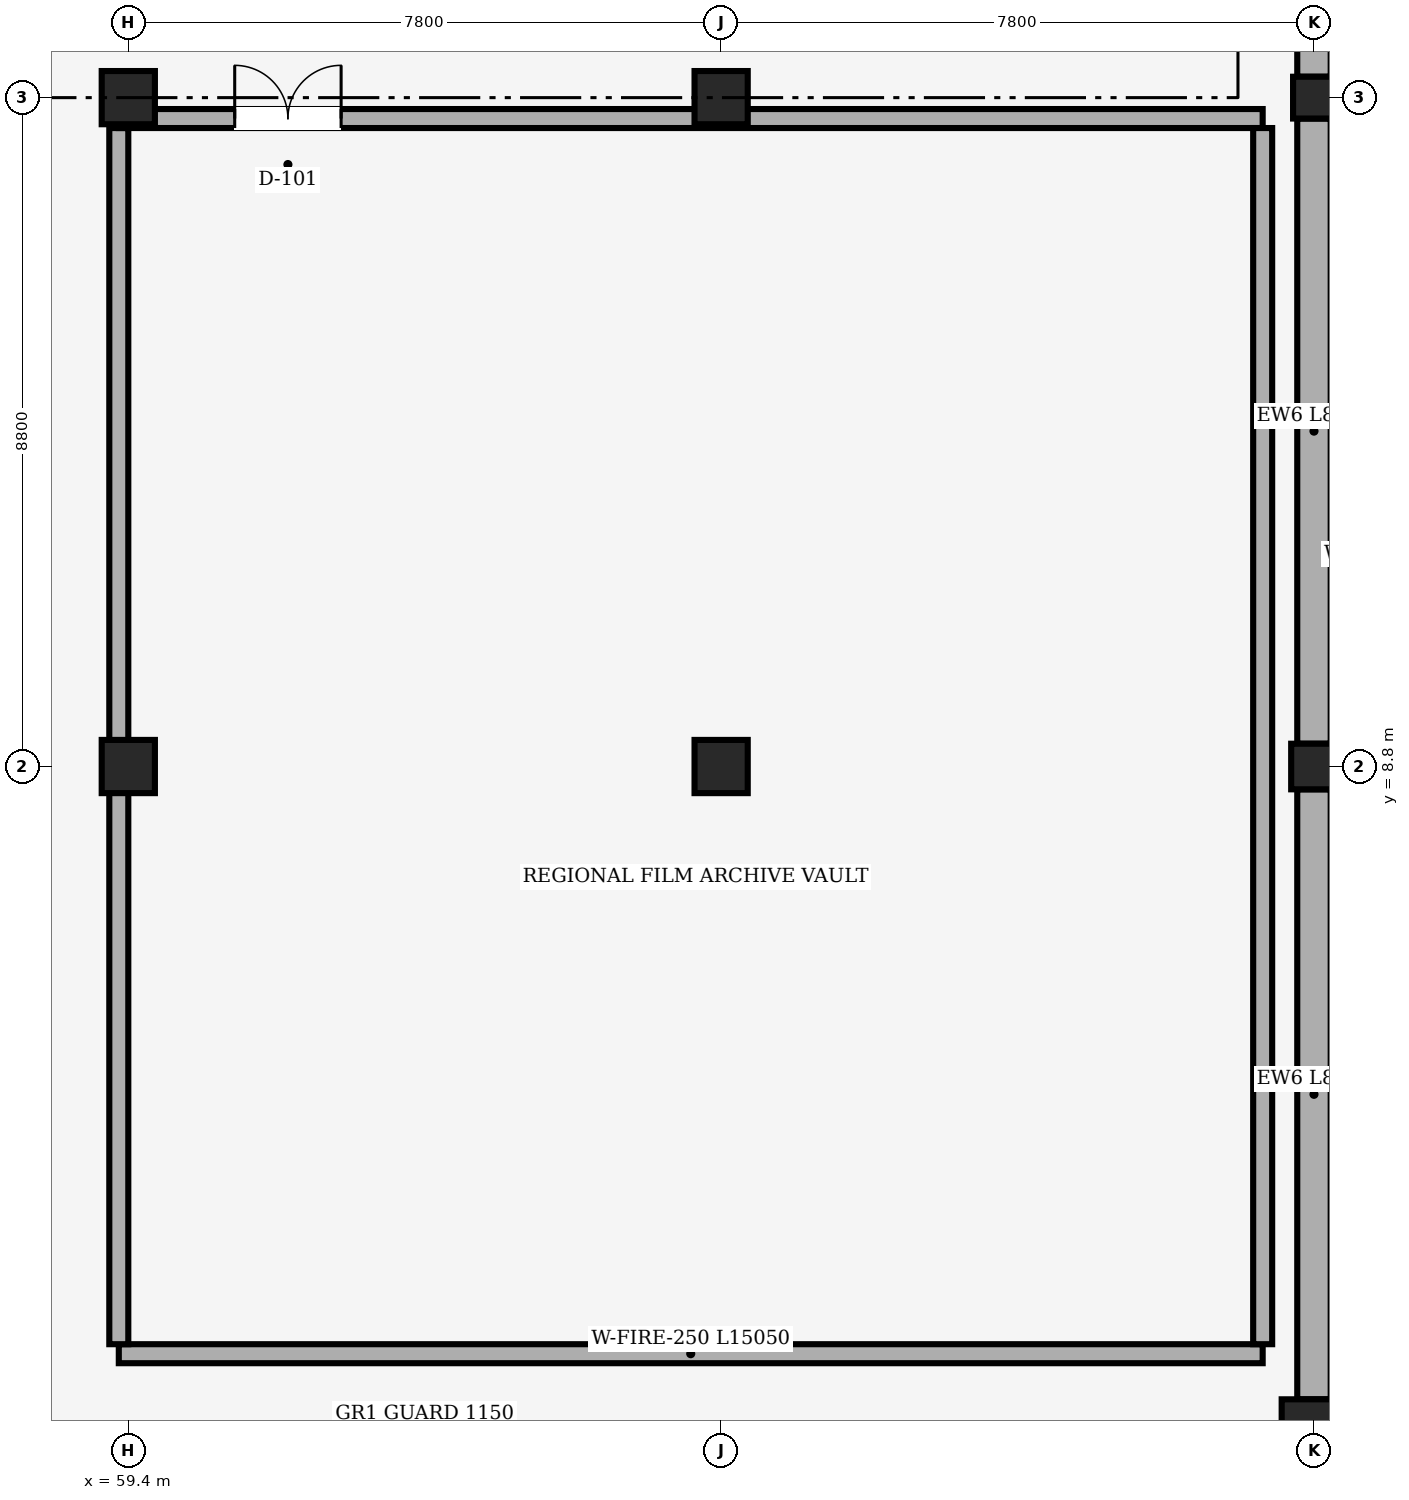
"""IFC4 building model, lengths in metres.
Left out: names, types, materials, properties, quantities, classifications, styles, units other than length and angle.
Written with IfcOpenShell. Run it as: python <this file> out.ifc"""

import sys

from ifc_helpers import new_model, si_unit, direction, frame, frame_2d, origin, origin_2d, place, context, subcontext, project, spatial, rectangle, circle, extrude, element, fill, save


model = new_model("IFC4")
c1 = context("Model", 3, precision=1e-05, world=origin(), true_north=direction((0.0, 1.0)))
c2 = subcontext(c1, "Body", "Model", "MODEL_VIEW")
j1 = project(units=[si_unit("LENGTHUNIT", "METRE"), si_unit("PLANEANGLEUNIT", "RADIAN")], contexts=[c1])
p1 = place(None, origin())
s1 = spatial("IfcSite", under=j1, at=p1, CompositionType="ELEMENT")
p2 = place(p1, origin())
s2 = spatial("IfcBuilding", under=s1, at=p2, CompositionType="ELEMENT")
p3 = place(p2, frame((0.0, 0.0, 15.6)))
s3 = spatial("IfcBuildingStorey", under=s2, at=p3, CompositionType="ELEMENT", Elevation=15.6)
for number, where, z_axis, x_axis in (
    (1, (59.4, 8.8, 0.0), (0.0, 0.0, 1.0), (1.0, 0.0, 0.0)),
    (2, (59.4, 17.6, 0.0), (0.0, 0.0, 1.0), (1.0, 0.0, 0.0)),
    (3, (67.2, 8.8, 0.0), (0.0, 0.0, 1.0), (1.0, 0.0, 0.0)),
    (4, (67.2, 17.6, 0.0), (0.0, 0.0, 1.0), (1.0, 0.0, 0.0)),
):
    element("IfcColumn", number, at=place(p3, frame(where, z_axis=z_axis, x_axis=x_axis)), inside=s3, PredefinedType="COLUMN", context=c2, shape_type="SweptSolid", body=[
        extrude(circle(Radius=0.35, at=origin_2d()), origin(), (0.0, 0.0, 1.0), 3.2),
    ])
p4 = place(p3, frame((75.0, 0.0, 0.0), z_axis=(0.0, 0.0, 1.0), x_axis=(1.0, 0.0, 0.0)))
e5 = element("IfcColumn", 5, at=p4, inside=s3, PredefinedType="COLUMN", context=c2, shape_type="SweptSolid", body=[
    extrude(rectangle(XDim=0.85, YDim=0.95, at=origin_2d()), origin(), (0.0, 0.0, 1.0), 3.2),
])
p5 = place(p3, frame((75.0, 8.8, 0.0), z_axis=(0.0, 0.0, 1.0), x_axis=(1.0, 0.0, 0.0)))
e6 = element("IfcColumn", 6, at=p5, inside=s3, PredefinedType="COLUMN", context=c2, shape_type="SweptSolid", body=[
    extrude(rectangle(XDim=0.6, YDim=0.6, at=origin_2d()), origin(), (0.0, 0.0, 1.0), 3.2),
])
p6 = place(p3, frame((75.0, 17.6, 0.0), z_axis=(0.0, 0.0, 1.0), x_axis=(1.0, 0.0, 0.0)))
e7 = element("IfcColumn", 7, at=p6, inside=s3, PredefinedType="COLUMN", context=c2, shape_type="SweptSolid", body=[
    extrude(rectangle(XDim=0.55, YDim=0.55, at=origin_2d()), origin(), (0.0, 0.0, 1.0), 3.2),
])
p7 = place(p3, frame((75.0, 0.475, 0.0), z_axis=(0.0, 0.0, 1.0), x_axis=(0.0, 1.0, 0.0)))
e8 = element("IfcWall", 8, at=p7, inside=s3, PredefinedType="SOLIDWALL", context=c2, shape_type="SweptSolid", body=[
    extrude(rectangle(XDim=8.025, YDim=0.44, at=frame_2d((4.012, 0.0))), origin(), (0.0, 0.0, 1.0), 2.535),
])
p8 = place(p3, frame((75.0, 9.1, 0.0), z_axis=(0.0, 0.0, 1.0), x_axis=(0.0, 1.0, 0.0)))
e9 = element("IfcWall", 9, at=p8, inside=s3, PredefinedType="SOLIDWALL", context=c2, shape_type="SweptSolid", body=[
    extrude(rectangle(XDim=8.225, YDim=0.44, at=frame_2d((4.112, 0.0))), origin(), (0.0, 0.0, 1.0), 2.585),
])
p9 = place(p3, frame((75.0, 17.875, 0.0), z_axis=(0.0, 0.0, 1.0), x_axis=(0.0, 1.0, 0.0)))
e10 = element("IfcWall", 10, at=p9, inside=s3, PredefinedType="SOLIDWALL", context=c2, shape_type="SweptSolid", body=[
    extrude(rectangle(XDim=8.225, YDim=0.44, at=frame_2d((4.113, 0.0))), origin(), (0.0, 0.0, 1.0), 2.585),
])
p10 = place(p3, frame((74.325, 1.075, 0.0), z_axis=(0.0, 0.0, 1.0), x_axis=(-1.0, 0.0, 0.0)))
e11 = element("IfcWall", 11, at=p10, inside=s3, PredefinedType="SOLIDWALL", context=c2, shape_type="SweptSolid", body=[
    extrude(rectangle(XDim=15.05, YDim=0.25, at=frame_2d((7.525, 0.0))), origin(), (0.0, 0.0, 1.0), 3.18),
])
p11 = place(p3, frame((59.275, 1.2, 0.0), z_axis=(0.0, 0.0, 1.0), x_axis=(0.0, 1.0, 0.0)))
e12 = element("IfcWall", 12, at=p11, inside=s3, PredefinedType="SOLIDWALL", context=c2, shape_type="SweptSolid", body=[
    extrude(rectangle(XDim=16.0, YDim=0.25, at=frame_2d((8.0, 0.0))), origin(), (0.0, 0.0, 1.0), 2.58),
])
p12 = place(p3, frame((59.275, 17.325, 0.0), z_axis=(0.0, 0.0, 1.0), x_axis=(1.0, 0.0, 0.0)))
e13 = element("IfcWall", 13, at=p12, inside=s3, PredefinedType="SOLIDWALL", context=c2, shape_type="SweptSolid", body=[
    extrude(rectangle(XDim=15.05, YDim=0.25, at=frame_2d((7.525, 0.0))), origin(), (0.0, 0.0, 1.0), 2.53),
])
p13 = place(p12, frame((1.525, 0.0, 0.0)))
e14 = element("IfcOpeningElement", 14, at=p13, cuts=e13, PredefinedType="OPENING", context=c2, shape_type="SweptSolid", body=[
    extrude(rectangle(XDim=1.4, YDim=2.15, at=frame_2d((0.7, 1.075))), frame((0.0, 0.125, 0.0), z_axis=(0.0, -1.0, 0.0), x_axis=(1.0, 0.0, 0.0)), (0.0, 0.0, 1.0), 0.25),
])
p14 = place(p3, frame((74.325, 17.2, 0.0), z_axis=(0.0, 0.0, 1.0), x_axis=(0.0, -1.0, 0.0)))
e15 = element("IfcWall", 15, at=p14, inside=s3, PredefinedType="SOLIDWALL", context=c2, shape_type="SweptSolid", body=[
    extrude(rectangle(XDim=16.0, YDim=0.25, at=frame_2d((8.0, 0.0))), origin(), (0.0, 0.0, 1.0), 3.18),
])
p15 = place(p13, origin())
e16 = element("IfcDoor", 16, at=p15, inside=s3, OperationType="DOUBLE_DOOR_SINGLE_SWING", PredefinedType="DOOR", context=c2, shape_type="SweptSolid", body=[
    extrude(rectangle(XDim=1.4, YDim=2.15, at=frame_2d((0.7, 1.075))), frame((0.0, 0.025, 0.0), z_axis=(0.0, -1.0, 0.0), x_axis=(1.0, 0.0, 0.0)), (0.0, 0.0, 1.0), 0.05),
])
fill(e14, e16)
save(model, sys.argv[1])
